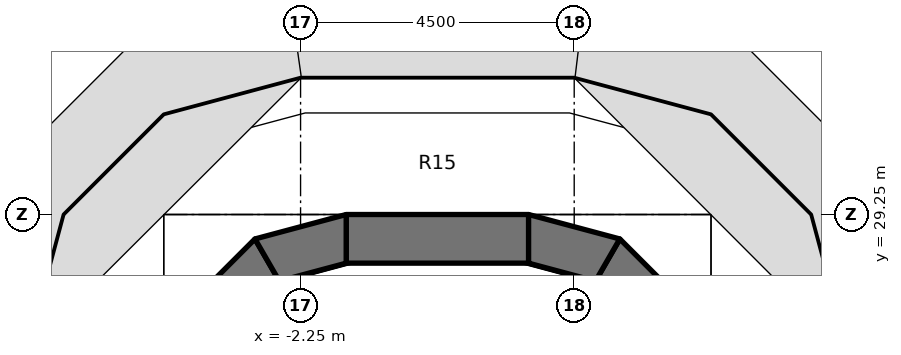
"""IFC4 building model, lengths in metres.
Left out: names, types, materials, properties, quantities, classifications, styles, units other than length and angle.
Written with IfcOpenShell. Run it as: python <this file> out.ifc"""

import sys

from ifc_helpers import new_model, si_unit, direction, frame, frame_2d, origin, place, context, subcontext, project, spatial, polyline, rectangle, outline, extrude, element, save


model = new_model("IFC4")
c1 = context("Model", 3, precision=1e-05, world=origin(), true_north=direction((0.0, 1.0)))
c2 = subcontext(c1, "Body", "Model", "MODEL_VIEW")
j1 = project(units=[si_unit("LENGTHUNIT", "METRE"), si_unit("PLANEANGLEUNIT", "RADIAN")], contexts=[c1])
p1 = place(None, origin())
s1 = spatial("IfcSite", under=j1, at=p1, CompositionType="ELEMENT")
p2 = place(p1, origin())
s2 = spatial("IfcBuilding", under=s1, at=p2, CompositionType="ELEMENT")
p3 = place(p2, frame((0.0, 0.0, 124.6)))
s3 = spatial("IfcBuildingStorey", under=s2, at=p3, CompositionType="ELEMENT", Elevation=124.6)
p4 = place(p3, frame((-1.5, 28.85, 0.0), z_axis=(0.0, 0.0, 1.0), x_axis=(1.0, 0.0, 0.0)))
e1 = element("IfcWall", 1, at=p4, inside=s3, PredefinedType="SHEAR", context=c2, shape_type="SweptSolid", body=[
    extrude(rectangle(XDim=3.0, YDim=0.8, at=frame_2d((1.5, 0.0))), origin(), (0.0, 0.0, 1.0), 3.8),
])
p5 = place(p3, origin())
e2 = element("IfcWall", 2, at=p5, inside=s3, PredefinedType="SHEAR", context=c2, shape_type="SweptSolid", body=[
    extrude(outline(polyline([(-4.098, 27.75), (-3.0, 28.848), (-2.6, 28.155), (-3.405, 27.35), (-4.098, 27.75)])), origin(), (0.0, 0.0, 1.0), 3.8),
])
p6 = place(p3, origin())
e3 = element("IfcWall", 3, at=p6, inside=s3, PredefinedType="SHEAR", context=c2, shape_type="SweptSolid", body=[
    extrude(outline(polyline([(-3.0, 28.848), (-1.5, 29.25), (-1.5, 28.45), (-2.6, 28.155), (-3.0, 28.848)])), origin(), (0.0, 0.0, 1.0), 3.8),
])
p7 = place(p3, origin())
e4 = element("IfcWall", 4, at=p7, inside=s3, PredefinedType="SHEAR", context=c2, shape_type="SweptSolid", body=[
    extrude(outline(polyline([(4.098, 27.75), (3.0, 28.848), (2.6, 28.155), (3.405, 27.35), (4.098, 27.75)])), origin(), (0.0, 0.0, 1.0), 3.8),
])
p8 = place(p3, origin())
e5 = element("IfcWall", 5, at=p8, inside=s3, PredefinedType="SHEAR", context=c2, shape_type="SweptSolid", body=[
    extrude(outline(polyline([(3.0, 28.848), (1.5, 29.25), (1.5, 28.45), (2.6, 28.155), (3.0, 28.848)])), origin(), (0.0, 0.0, 1.0), 3.8),
])
save(model, sys.argv[1])
